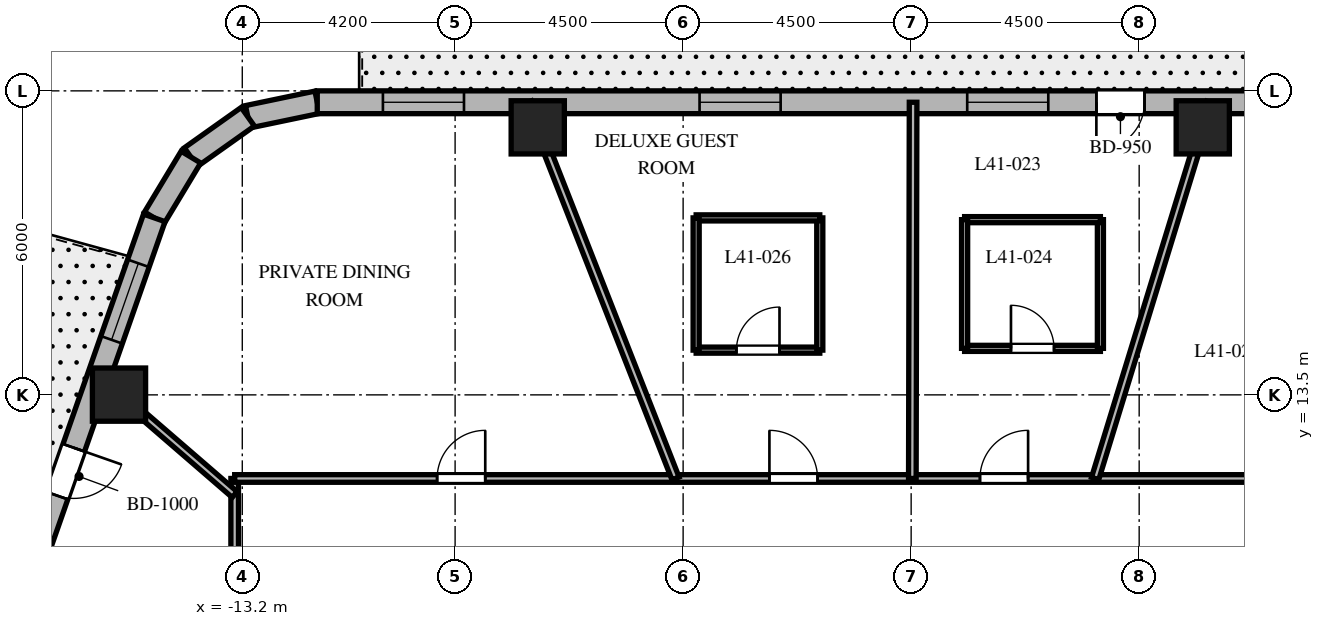
"""IFC4 building model, lengths in metres.
Left out: names, types, materials, properties, quantities, classifications, styles, units other than length and angle.
Written with IfcOpenShell. Run it as: python <this file> out.ifc"""

import sys

from ifc_helpers import new_model, si_unit, direction, frame, frame_2d, origin, origin_2d, place, context, subcontext, project, spatial, rectangle, extrude, element, fill, save


model = new_model("IFC4")
c1 = context("Model", 3, precision=1e-05, world=origin(), true_north=direction((0.0, 1.0)))
c2 = subcontext(c1, "Body", "Model", "MODEL_VIEW")
j1 = project(units=[si_unit("LENGTHUNIT", "METRE"), si_unit("PLANEANGLEUNIT", "RADIAN")], contexts=[c1])
p1 = place(None, origin())
s1 = spatial("IfcSite", under=j1, at=p1, CompositionType="ELEMENT")
p2 = place(p1, origin())
s2 = spatial("IfcBuilding", under=s1, at=p2, CompositionType="ELEMENT")
p3 = place(p2, frame((0.0, 0.0, 166.5)))
s3 = spatial("IfcBuildingStorey", under=s2, at=p3, CompositionType="ELEMENT", Elevation=166.5)
for number, where, z_axis, x_axis in (
    (1, (5.755, 18.78, 0.0), (0.0, 0.0, 1.0), (1.0, 0.0, 0.0)),
    (2, (-7.369, 18.78, 0.0), (0.0, 0.0, 1.0), (1.0, 0.0, 0.0)),
    (3, (-15.633, 13.505, 0.0), (0.0, 0.0, 1.0), (1.0, 0.0, 0.0)),
):
    element("IfcColumn", number, at=place(p3, frame(where, z_axis=z_axis, x_axis=x_axis)), inside=s3, PredefinedType="COLUMN", context=c2, shape_type="SweptSolid", body=[
        extrude(rectangle(XDim=1.05, YDim=1.05, at=origin_2d()), origin(), (0.0, 0.0, 1.0), 3.7),
    ])
p4 = place(p3, frame((-11.72, 19.275, 0.0), z_axis=(0.0, 0.0, 1.0), x_axis=(-0.97893106758, -0.204191001093, 0.0)))
e4 = element("IfcWall", 4, at=p4, inside=s3, PredefinedType="SOLIDWALL", context=c2, shape_type="SweptSolid", body=[
    extrude(rectangle(XDim=1.4, YDim=0.45, at=frame_2d((0.7, 0.0))), origin(), (0.0, 0.0, 1.0), 3.38),
])
p5 = place(p3, frame((-13.091, 18.989, 0.0), z_axis=(0.0, 0.0, 1.0), x_axis=(-0.815574637848, -0.578651890258, 0.0)))
e5 = element("IfcWall", 5, at=p5, inside=s3, PredefinedType="SOLIDWALL", context=c2, shape_type="SweptSolid", body=[
    extrude(rectangle(XDim=1.377, YDim=0.45, at=frame_2d((0.688, 0.0))), origin(), (0.0, 0.0, 1.0), 3.38),
])
p6 = place(p3, frame((-14.214, 18.192, 0.0), z_axis=(0.0, 0.0, 1.0), x_axis=(-0.516340945502, -0.856383108193, 0.0)))
e6 = element("IfcWall", 6, at=p6, inside=s3, PredefinedType="SOLIDWALL", context=c2, shape_type="SweptSolid", body=[
    extrude(rectangle(XDim=1.4, YDim=0.45, at=frame_2d((0.7, 0.0))), origin(), (0.0, 0.0, 1.0), 3.38),
])
p7 = place(p3, frame((10.108, 19.275, 0.0), z_axis=(0.0, 0.0, 1.0), x_axis=(-1.0, 0.0, 0.0)))
e7 = element("IfcWall", 7, at=p7, inside=s3, PredefinedType="SOLIDWALL", context=c2, shape_type="SweptSolid", body=[
    extrude(rectangle(XDim=21.829, YDim=0.45, at=frame_2d((10.915, 0.0))), origin(), (0.0, 0.0, 1.0), 3.38),
])
p8 = place(p7, frame((5.503, 0.0, 0.0)))
e8 = element("IfcOpeningElement", 8, at=p8, cuts=e7, PredefinedType="OPENING", context=c2, shape_type="SweptSolid", body=[
    extrude(rectangle(XDim=0.95, YDim=2.15, at=frame_2d((0.475, 1.075))), frame((0.0, 0.235, 0.0), z_axis=(0.0, -1.0, 0.0), x_axis=(1.0, 0.0, 0.0)), (0.0, 0.0, 1.0), 0.47),
])
p9 = place(p7, frame((1.297, 0.0, 0.8)))
e9 = element("IfcOpeningElement", 9, at=p9, cuts=e7, PredefinedType="OPENING", context=c2, shape_type="SweptSolid", body=[
    extrude(rectangle(XDim=1.6, YDim=1.75, at=frame_2d((0.8, 0.875))), frame((0.0, 0.235, 0.0), z_axis=(0.0, -1.0, 0.0), x_axis=(1.0, 0.0, 0.0)), (0.0, 0.0, 1.0), 0.47),
])
p10 = place(p7, frame((7.402, 0.0, 0.8)))
e10 = element("IfcOpeningElement", 10, at=p10, cuts=e7, PredefinedType="OPENING", context=c2, shape_type="SweptSolid", body=[
    extrude(rectangle(XDim=1.6, YDim=1.75, at=frame_2d((0.8, 0.875))), frame((0.0, 0.235, 0.0), z_axis=(0.0, -1.0, 0.0), x_axis=(1.0, 0.0, 0.0)), (0.0, 0.0, 1.0), 0.47),
])
p11 = place(p7, frame((12.684, 0.0, 0.8)))
e11 = element("IfcOpeningElement", 11, at=p11, cuts=e7, PredefinedType="OPENING", context=c2, shape_type="SweptSolid", body=[
    extrude(rectangle(XDim=1.6, YDim=1.75, at=frame_2d((0.8, 0.875))), frame((0.0, 0.235, 0.0), z_axis=(0.0, -1.0, 0.0), x_axis=(1.0, 0.0, 0.0)), (0.0, 0.0, 1.0), 0.47),
])
p12 = place(p7, frame((18.933, 0.0, 0.8)))
e12 = element("IfcOpeningElement", 12, at=p12, cuts=e7, PredefinedType="OPENING", context=c2, shape_type="SweptSolid", body=[
    extrude(rectangle(XDim=1.6, YDim=1.75, at=frame_2d((0.8, 0.875))), frame((0.0, 0.235, 0.0), z_axis=(0.0, -1.0, 0.0), x_axis=(1.0, 0.0, 0.0)), (0.0, 0.0, 1.0), 0.47),
])
p13 = place(p3, frame((-14.937, 16.993, 0.0), z_axis=(0.0, 0.0, 1.0), x_axis=(-0.330431575061, -0.943829949834, 0.0)))
e13 = element("IfcWall", 13, at=p13, inside=s3, PredefinedType="SOLIDWALL", context=c2, shape_type="SweptSolid", body=[
    extrude(rectangle(XDim=17.689, YDim=0.45, at=frame_2d((8.844, 0.0))), origin(), (0.0, 0.0, 1.0), 3.38),
])
p14 = place(p13, frame((4.807, 0.0, 0.0)))
e14 = element("IfcOpeningElement", 14, at=p14, cuts=e13, PredefinedType="OPENING", context=c2, shape_type="SweptSolid", body=[
    extrude(rectangle(XDim=1.0, YDim=2.15, at=frame_2d((0.5, 1.075))), frame((0.0, 0.235, 0.0), z_axis=(0.0, -1.0, 0.0), x_axis=(1.0, 0.0, 0.0)), (0.0, 0.0, 1.0), 0.47),
])
p15 = place(p13, frame((0.95, 0.0, 0.8)))
e15 = element("IfcOpeningElement", 15, at=p15, cuts=e13, PredefinedType="OPENING", context=c2, shape_type="SweptSolid", body=[
    extrude(rectangle(XDim=1.6, YDim=1.75, at=frame_2d((0.8, 0.875))), frame((0.0, 0.235, 0.0), z_axis=(0.0, -1.0, 0.0), x_axis=(1.0, 0.0, 0.0)), (0.0, 0.0, 1.0), 0.47),
])
p16 = place(p13, frame((6.623, 0.0, 0.8)))
e16 = element("IfcOpeningElement", 16, at=p16, cuts=e13, PredefinedType="OPENING", context=c2, shape_type="SweptSolid", body=[
    extrude(rectangle(XDim=1.6, YDim=1.75, at=frame_2d((0.8, 0.875))), frame((0.0, 0.235, 0.0), z_axis=(0.0, -1.0, 0.0), x_axis=(1.0, 0.0, 0.0)), (0.0, 0.0, 1.0), 0.47),
])
p17 = place(p13, frame((10.849, 0.0, 0.8)))
e17 = element("IfcOpeningElement", 17, at=p17, cuts=e13, PredefinedType="OPENING", context=c2, shape_type="SweptSolid", body=[
    extrude(rectangle(XDim=1.6, YDim=1.75, at=frame_2d((0.8, 0.875))), frame((0.0, 0.235, 0.0), z_axis=(0.0, -1.0, 0.0), x_axis=(1.0, 0.0, 0.0)), (0.0, 0.0, 1.0), 0.47),
])
p18 = place(p13, frame((15.084, 0.0, 0.8)))
e18 = element("IfcOpeningElement", 18, at=p18, cuts=e13, PredefinedType="OPENING", context=c2, shape_type="SweptSolid", body=[
    extrude(rectangle(XDim=1.6, YDim=1.75, at=frame_2d((0.8, 0.875))), frame((0.0, 0.235, 0.0), z_axis=(0.0, -1.0, 0.0), x_axis=(1.0, 0.0, 0.0)), (0.0, 0.0, 1.0), 0.47),
])
p19 = place(p3, frame((-13.35, -11.85, 0.0), z_axis=(0.0, 0.0, 1.0), x_axis=(0.0, 1.0, 0.0)))
e19 = element("IfcWall", 19, at=p19, inside=s3, PredefinedType="PARTITIONING", context=c2, shape_type="SweptSolid", body=[
    extrude(rectangle(XDim=23.7, YDim=0.15, at=frame_2d((11.85, 0.0))), origin(), (0.0, 0.0, 1.0), 2.82),
])
p20 = place(p19, frame((20.136, 0.0, 0.0)))
e20 = element("IfcOpeningElement", 20, at=p20, cuts=e19, PredefinedType="OPENING", context=c2, shape_type="SweptSolid", body=[
    extrude(rectangle(XDim=0.9, YDim=2.03, at=frame_2d((0.45, 1.015))), frame((0.0, 0.085, 0.0), z_axis=(0.0, -1.0, 0.0), x_axis=(1.0, 0.0, 0.0)), (0.0, 0.0, 1.0), 0.17),
])
p21 = place(p19, frame((15.551, 0.0, 0.0)))
e21 = element("IfcOpeningElement", 21, at=p21, cuts=e19, PredefinedType="OPENING", context=c2, shape_type="SweptSolid", body=[
    extrude(rectangle(XDim=0.9, YDim=2.03, at=frame_2d((0.45, 1.015))), frame((0.0, 0.085, 0.0), z_axis=(0.0, -1.0, 0.0), x_axis=(1.0, 0.0, 0.0)), (0.0, 0.0, 1.0), 0.17),
])
p22 = place(p19, frame((12.494, 0.0, 0.0)))
e22 = element("IfcOpeningElement", 22, at=p22, cuts=e19, PredefinedType="OPENING", context=c2, shape_type="SweptSolid", body=[
    extrude(rectangle(XDim=0.9, YDim=2.03, at=frame_2d((0.45, 1.015))), frame((0.0, 0.085, 0.0), z_axis=(0.0, -1.0, 0.0), x_axis=(1.0, 0.0, 0.0)), (0.0, 0.0, 1.0), 0.17),
])
p23 = place(p19, frame((9.424, 0.0, 0.0)))
e23 = element("IfcOpeningElement", 23, at=p23, cuts=e19, PredefinedType="OPENING", context=c2, shape_type="SweptSolid", body=[
    extrude(rectangle(XDim=0.95, YDim=2.03, at=frame_2d((0.475, 1.015))), frame((0.0, 0.085, 0.0), z_axis=(0.0, -1.0, 0.0), x_axis=(1.0, 0.0, 0.0)), (0.0, 0.0, 1.0), 0.17),
])
p24 = place(p19, frame((3.765, 0.0, 0.0)))
e24 = element("IfcOpeningElement", 24, at=p24, cuts=e19, PredefinedType="OPENING", context=c2, shape_type="SweptSolid", body=[
    extrude(rectangle(XDim=0.9, YDim=2.03, at=frame_2d((0.45, 1.015))), frame((0.0, 0.085, 0.0), z_axis=(0.0, -1.0, 0.0), x_axis=(1.0, 0.0, 0.0)), (0.0, 0.0, 1.0), 0.17),
])
p25 = place(p3, frame((-13.35, 11.85, 0.0), z_axis=(0.0, 0.0, 1.0), x_axis=(1.0, 0.0, 0.0)))
e25 = element("IfcWall", 25, at=p25, inside=s3, PredefinedType="PARTITIONING", context=c2, shape_type="SweptSolid", body=[
    extrude(rectangle(XDim=26.7, YDim=0.15, at=frame_2d((13.35, 0.0))), origin(), (0.0, 0.0, 1.0), 2.82),
])
p26 = place(p25, frame((20.682, 0.0, 0.0)))
e26 = element("IfcOpeningElement", 26, at=p26, cuts=e25, PredefinedType="OPENING", context=c2, shape_type="SweptSolid", body=[
    extrude(rectangle(XDim=0.95, YDim=2.03, at=frame_2d((0.475, 1.015))), frame((0.0, 0.085, 0.0), z_axis=(0.0, -1.0, 0.0), x_axis=(1.0, 0.0, 0.0)), (0.0, 0.0, 1.0), 0.17),
])
p27 = place(p25, frame((14.708, 0.0, 0.0)))
e27 = element("IfcOpeningElement", 27, at=p27, cuts=e25, PredefinedType="OPENING", context=c2, shape_type="SweptSolid", body=[
    extrude(rectangle(XDim=0.95, YDim=2.03, at=frame_2d((0.475, 1.015))), frame((0.0, 0.085, 0.0), z_axis=(0.0, -1.0, 0.0), x_axis=(1.0, 0.0, 0.0)), (0.0, 0.0, 1.0), 0.17),
])
p28 = place(p25, frame((10.553, 0.0, 0.0)))
e28 = element("IfcOpeningElement", 28, at=p28, cuts=e25, PredefinedType="OPENING", context=c2, shape_type="SweptSolid", body=[
    extrude(rectangle(XDim=0.95, YDim=2.03, at=frame_2d((0.475, 1.015))), frame((0.0, 0.085, 0.0), z_axis=(0.0, -1.0, 0.0), x_axis=(1.0, 0.0, 0.0)), (0.0, 0.0, 1.0), 0.17),
])
p29 = place(p25, frame((3.995, 0.0, 0.0)))
e29 = element("IfcOpeningElement", 29, at=p29, cuts=e25, PredefinedType="OPENING", context=c2, shape_type="SweptSolid", body=[
    extrude(rectangle(XDim=0.95, YDim=2.03, at=frame_2d((0.475, 1.015))), frame((0.0, 0.085, 0.0), z_axis=(0.0, -1.0, 0.0), x_axis=(1.0, 0.0, 0.0)), (0.0, 0.0, 1.0), 0.17),
])
p30 = place(p3, frame((3.631, 11.85, 0.0), z_axis=(0.0, 0.0, 1.0), x_axis=(0.293007573338, 0.956110120209, 0.0)))
e30 = element("IfcWall", 30, at=p30, inside=s3, PredefinedType="PARTITIONING", context=c2, shape_type="SweptSolid", body=[
    extrude(rectangle(XDim=7.766, YDim=0.15, at=frame_2d((3.883, 0.0))), origin(), (0.0, 0.0, 1.0), 2.62),
])
p31 = place(p3, frame((0.024, 11.85, 0.0), z_axis=(0.0, 0.0, 1.0), x_axis=(0.001972901592, 0.999998053828, 0.0)))
e31 = element("IfcWall", 31, at=p31, inside=s3, PredefinedType="PARTITIONING", context=c2, shape_type="SweptSolid", body=[
    extrude(rectangle(XDim=7.425, YDim=0.15, at=frame_2d((3.712, 0.0))), origin(), (0.0, 0.0, 1.0), 2.62),
])
p32 = place(p3, frame((-4.65, 11.85, 0.0), z_axis=(0.0, 0.0, 1.0), x_axis=(-0.365265947993, 0.930903210456, 0.0)))
e32 = element("IfcWall", 32, at=p32, inside=s3, PredefinedType="PARTITIONING", context=c2, shape_type="SweptSolid", body=[
    extrude(rectangle(XDim=7.976, YDim=0.15, at=frame_2d((3.988, 0.0))), origin(), (0.0, 0.0, 1.0), 2.62),
])
p33 = place(p3, frame((-13.35, 11.533, 0.0), z_axis=(0.0, 0.0, 1.0), x_axis=(-0.756711647314, 0.65374879183, 0.0)))
e33 = element("IfcWall", 33, at=p33, inside=s3, PredefinedType="PARTITIONING", context=c2, shape_type="SweptSolid", body=[
    extrude(rectangle(XDim=3.55, YDim=0.15, at=frame_2d((1.775, 0.0))), origin(), (0.0, 0.0, 1.0), 2.62),
])
p34 = place(p3, frame((1.055, 14.418, 0.0), z_axis=(0.0, 0.0, 1.0), x_axis=(1.0, 0.0, 0.0)))
e34 = element("IfcWall", 34, at=p34, inside=s3, PredefinedType="PARTITIONING", context=c2, shape_type="SweptSolid", body=[
    extrude(rectangle(XDim=2.68, YDim=0.12, at=frame_2d((1.34, 0.0))), origin(), (0.0, 0.0, 1.0), 3.38),
])
p35 = place(p34, frame((0.915, 0.0, 0.0)))
e35 = element("IfcOpeningElement", 35, at=p35, cuts=e34, PredefinedType="OPENING", context=c2, shape_type="SweptSolid", body=[
    extrude(rectangle(XDim=0.85, YDim=2.03, at=frame_2d((0.425, 1.015))), frame((0.0, 0.07, 0.0), z_axis=(0.0, -1.0, 0.0), x_axis=(1.0, 0.0, 0.0)), (0.0, 0.0, 1.0), 0.14),
])
p36 = place(p3, frame((3.735, 14.418, 0.0), z_axis=(0.0, 0.0, 1.0), x_axis=(0.0, 1.0, 0.0)))
e36 = element("IfcWall", 36, at=p36, inside=s3, PredefinedType="PARTITIONING", context=c2, shape_type="SweptSolid", body=[
    extrude(rectangle(XDim=2.54, YDim=0.12, at=frame_2d((1.27, 0.0))), origin(), (0.0, 0.0, 1.0), 2.82),
])
p37 = place(p3, frame((3.735, 16.958, 0.0), z_axis=(0.0, 0.0, 1.0), x_axis=(-1.0, 0.0, 0.0)))
e37 = element("IfcWall", 37, at=p37, inside=s3, PredefinedType="PARTITIONING", context=c2, shape_type="SweptSolid", body=[
    extrude(rectangle(XDim=2.68, YDim=0.12, at=frame_2d((1.34, 0.0))), origin(), (0.0, 0.0, 1.0), 3.38),
])
p38 = place(p3, frame((1.055, 16.958, 0.0), z_axis=(0.0, 0.0, 1.0), x_axis=(0.0, -1.0, 0.0)))
e38 = element("IfcWall", 38, at=p38, inside=s3, PredefinedType="PARTITIONING", context=c2, shape_type="SweptSolid", body=[
    extrude(rectangle(XDim=2.54, YDim=0.12, at=frame_2d((1.27, 0.0))), origin(), (0.0, 0.0, 1.0), 2.82),
])
p39 = place(p3, frame((-4.243, 14.383, 0.0), z_axis=(0.0, 0.0, 1.0), x_axis=(1.0, 0.0, 0.0)))
e39 = element("IfcWall", 39, at=p39, inside=s3, PredefinedType="PARTITIONING", context=c2, shape_type="SweptSolid", body=[
    extrude(rectangle(XDim=2.44, YDim=0.12, at=frame_2d((1.22, 0.0))), origin(), (0.0, 0.0, 1.0), 3.38),
])
p40 = place(p39, frame((0.795, 0.0, 0.0)))
e40 = element("IfcOpeningElement", 40, at=p40, cuts=e39, PredefinedType="OPENING", context=c2, shape_type="SweptSolid", body=[
    extrude(rectangle(XDim=0.85, YDim=2.03, at=frame_2d((0.425, 1.015))), frame((0.0, 0.07, 0.0), z_axis=(0.0, -1.0, 0.0), x_axis=(1.0, 0.0, 0.0)), (0.0, 0.0, 1.0), 0.14),
])
p41 = place(p3, frame((-1.803, 14.383, 0.0), z_axis=(0.0, 0.0, 1.0), x_axis=(0.0, 1.0, 0.0)))
e41 = element("IfcWall", 41, at=p41, inside=s3, PredefinedType="PARTITIONING", context=c2, shape_type="SweptSolid", body=[
    extrude(rectangle(XDim=2.61, YDim=0.12, at=frame_2d((1.305, 0.0))), origin(), (0.0, 0.0, 1.0), 2.82),
])
p42 = place(p3, frame((-1.803, 16.993, 0.0), z_axis=(0.0, 0.0, 1.0), x_axis=(-1.0, 0.0, 0.0)))
e42 = element("IfcWall", 42, at=p42, inside=s3, PredefinedType="PARTITIONING", context=c2, shape_type="SweptSolid", body=[
    extrude(rectangle(XDim=2.44, YDim=0.12, at=frame_2d((1.22, 0.0))), origin(), (0.0, 0.0, 1.0), 3.38),
])
p43 = place(p3, frame((-4.243, 16.993, 0.0), z_axis=(0.0, 0.0, 1.0), x_axis=(0.0, -1.0, 0.0)))
e43 = element("IfcWall", 43, at=p43, inside=s3, PredefinedType="PARTITIONING", context=c2, shape_type="SweptSolid", body=[
    extrude(rectangle(XDim=2.61, YDim=0.12, at=frame_2d((1.305, 0.0))), origin(), (0.0, 0.0, 1.0), 2.82),
])
p44 = place(p8, origin())
e44 = element("IfcDoor", 44, at=p44, inside=s3, OperationType="SINGLE_SWING_RIGHT", PredefinedType="DOOR", context=c2, shape_type="SweptSolid", body=[
    extrude(rectangle(XDim=0.95, YDim=2.15, at=frame_2d((0.475, 1.075))), frame((0.0, 0.025, 0.0), z_axis=(0.0, -1.0, 0.0), x_axis=(1.0, 0.0, 0.0)), (0.0, 0.0, 1.0), 0.05),
])
fill(e8, e44)
p45 = place(p10, origin())
e45 = element("IfcWindow", 45, at=p45, inside=s3, PartitioningType="SINGLE_PANEL", PredefinedType="WINDOW", context=c2, shape_type="SweptSolid", body=[
    extrude(rectangle(XDim=1.6, YDim=1.75, at=frame_2d((0.8, 0.875))), frame((0.0, 0.03, 0.0), z_axis=(0.0, -1.0, 0.0), x_axis=(1.0, 0.0, 0.0)), (0.0, 0.0, 1.0), 0.06),
])
fill(e10, e45)
p46 = place(p11, origin())
e46 = element("IfcWindow", 46, at=p46, inside=s3, PartitioningType="SINGLE_PANEL", PredefinedType="WINDOW", context=c2, shape_type="SweptSolid", body=[
    extrude(rectangle(XDim=1.6, YDim=1.75, at=frame_2d((0.8, 0.875))), frame((0.0, 0.03, 0.0), z_axis=(0.0, -1.0, 0.0), x_axis=(1.0, 0.0, 0.0)), (0.0, 0.0, 1.0), 0.06),
])
fill(e11, e46)
p47 = place(p12, origin())
e47 = element("IfcWindow", 47, at=p47, inside=s3, PartitioningType="SINGLE_PANEL", PredefinedType="WINDOW", context=c2, shape_type="SweptSolid", body=[
    extrude(rectangle(XDim=1.6, YDim=1.75, at=frame_2d((0.8, 0.875))), frame((0.0, 0.03, 0.0), z_axis=(0.0, -1.0, 0.0), x_axis=(1.0, 0.0, 0.0)), (0.0, 0.0, 1.0), 0.06),
])
fill(e12, e47)
p48 = place(p14, origin())
e48 = element("IfcDoor", 48, at=p48, inside=s3, OperationType="SINGLE_SWING_LEFT", PredefinedType="DOOR", context=c2, shape_type="SweptSolid", body=[
    extrude(rectangle(XDim=1.0, YDim=2.15, at=frame_2d((0.5, 1.075))), frame((0.0, 0.025, 0.0), z_axis=(0.0, -1.0, 0.0), x_axis=(1.0, 0.0, 0.0)), (0.0, 0.0, 1.0), 0.05),
])
fill(e14, e48)
p49 = place(p15, origin())
e49 = element("IfcWindow", 49, at=p49, inside=s3, PartitioningType="SINGLE_PANEL", PredefinedType="WINDOW", context=c2, shape_type="SweptSolid", body=[
    extrude(rectangle(XDim=1.6, YDim=1.75, at=frame_2d((0.8, 0.875))), frame((0.0, 0.03, 0.0), z_axis=(0.0, -1.0, 0.0), x_axis=(1.0, 0.0, 0.0)), (0.0, 0.0, 1.0), 0.06),
])
fill(e15, e49)
p50 = place(p27, origin())
e50 = element("IfcDoor", 50, at=p50, inside=s3, OperationType="SINGLE_SWING_RIGHT", PredefinedType="DOOR", context=c2, shape_type="SweptSolid", body=[
    extrude(rectangle(XDim=0.95, YDim=2.03, at=frame_2d((0.475, 1.015))), frame((0.0, 0.025, 0.0), z_axis=(0.0, -1.0, 0.0), x_axis=(1.0, 0.0, 0.0)), (0.0, 0.0, 1.0), 0.05),
])
fill(e27, e50)
p51 = place(p35, origin())
e51 = element("IfcDoor", 51, at=p51, inside=s3, OperationType="SINGLE_SWING_LEFT", PredefinedType="DOOR", context=c2, shape_type="SweptSolid", body=[
    extrude(rectangle(XDim=0.85, YDim=2.03, at=frame_2d((0.425, 1.015))), frame((0.0, 0.025, 0.0), z_axis=(0.0, -1.0, 0.0), x_axis=(1.0, 0.0, 0.0)), (0.0, 0.0, 1.0), 0.05),
])
fill(e35, e51)
p52 = place(p28, origin())
e52 = element("IfcDoor", 52, at=p52, inside=s3, OperationType="SINGLE_SWING_LEFT", PredefinedType="DOOR", context=c2, shape_type="SweptSolid", body=[
    extrude(rectangle(XDim=0.95, YDim=2.03, at=frame_2d((0.475, 1.015))), frame((0.0, 0.025, 0.0), z_axis=(0.0, -1.0, 0.0), x_axis=(1.0, 0.0, 0.0)), (0.0, 0.0, 1.0), 0.05),
])
fill(e28, e52)
p53 = place(p40, origin())
e53 = element("IfcDoor", 53, at=p53, inside=s3, OperationType="SINGLE_SWING_RIGHT", PredefinedType="DOOR", context=c2, shape_type="SweptSolid", body=[
    extrude(rectangle(XDim=0.85, YDim=2.03, at=frame_2d((0.425, 1.015))), frame((0.0, 0.025, 0.0), z_axis=(0.0, -1.0, 0.0), x_axis=(1.0, 0.0, 0.0)), (0.0, 0.0, 1.0), 0.05),
])
fill(e40, e53)
p54 = place(p29, origin())
e54 = element("IfcDoor", 54, at=p54, inside=s3, OperationType="SINGLE_SWING_RIGHT", PredefinedType="DOOR", context=c2, shape_type="SweptSolid", body=[
    extrude(rectangle(XDim=0.95, YDim=2.03, at=frame_2d((0.475, 1.015))), frame((0.0, 0.025, 0.0), z_axis=(0.0, -1.0, 0.0), x_axis=(1.0, 0.0, 0.0)), (0.0, 0.0, 1.0), 0.05),
])
fill(e29, e54)
save(model, sys.argv[1])
